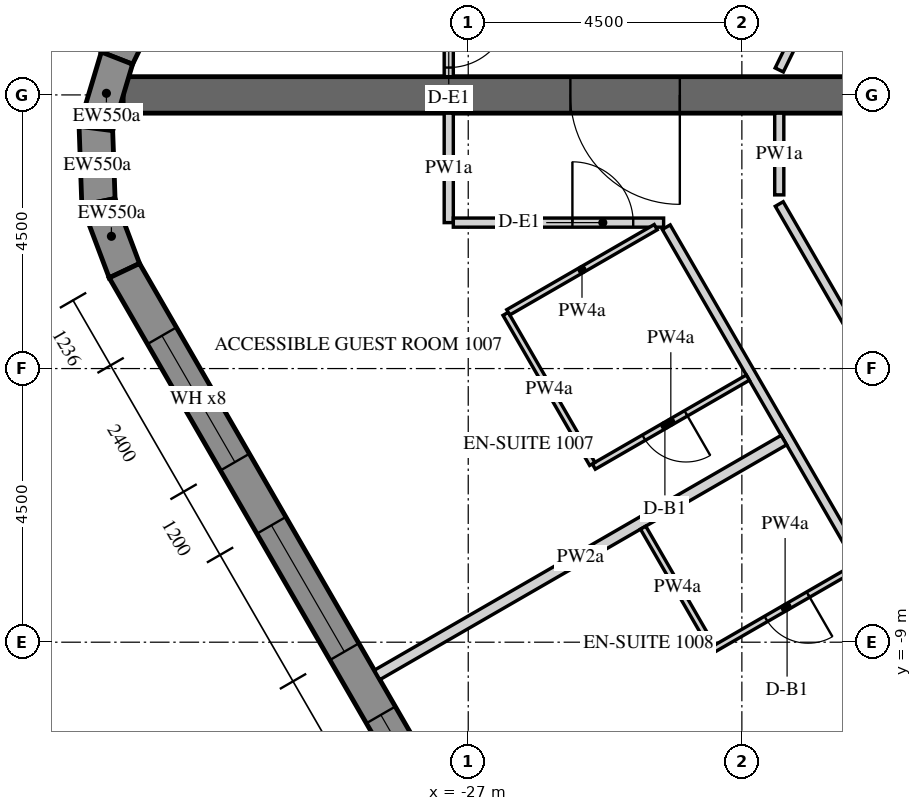
"""IFC4 building model, lengths in metres.
Left out: names, types, materials, properties, quantities, classifications, styles, units other than length and angle.
Written with IfcOpenShell. Run it as: python <this file> out.ifc"""

import sys

from ifc_helpers import new_model, si_unit, direction, frame, frame_2d, origin, place, context, subcontext, project, spatial, polyline, rectangle, outline, extrude, element, fill, save


model = new_model("IFC4")
c1 = context("Model", 3, precision=1e-05, world=origin(), true_north=direction((0.0, 1.0)))
c2 = subcontext(c1, "Body", "Model", "MODEL_VIEW")
j1 = project(units=[si_unit("LENGTHUNIT", "METRE"), si_unit("PLANEANGLEUNIT", "RADIAN")], contexts=[c1])
p1 = place(None, origin())
s1 = spatial("IfcSite", under=j1, at=p1, CompositionType="ELEMENT")
p2 = place(p1, origin())
s2 = spatial("IfcBuilding", under=s1, at=p2, CompositionType="ELEMENT")
p3 = place(p2, frame((0.0, 0.0, 142.8)))
s3 = spatial("IfcBuildingStorey", under=s2, at=p3, CompositionType="ELEMENT", Elevation=142.8)
p4 = place(p3, frame((-19.595, 27.633, -0.15), z_axis=(0.0, 0.0, 1.0), x_axis=(-0.438368285794, -0.898795441694, 0.0)))
e1 = element("IfcWall", 1, at=p4, inside=s3, PredefinedType="SOLIDWALL", context=c2, shape_type="SweptSolid", body=[
    extrude(outline(polyline([(-0.026, -0.275), (30.093, -0.275), (30.048, 0.275), (0.026, 0.275), (-0.026, -0.275)])), origin(), (0.0, 0.0, 1.0), 3.75),
])
p5 = place(p4, frame((1.236, 0.0, 1.05)))
e2 = element("IfcOpeningElement", 2, at=p5, cuts=e1, PredefinedType="OPENING", context=c2, shape_type="SweptSolid", body=[
    extrude(rectangle(XDim=2.4, YDim=2.4, at=frame_2d((1.2, 1.2))), frame((0.0, 0.285, 0.0), z_axis=(0.0, -1.0, 0.0), x_axis=(1.0, 0.0, 0.0)), (0.0, 0.0, 1.0), 0.57),
])
p6 = place(p4, frame((4.835, 0.0, 1.05)))
e3 = element("IfcOpeningElement", 3, at=p6, cuts=e1, PredefinedType="OPENING", context=c2, shape_type="SweptSolid", body=[
    extrude(rectangle(XDim=2.4, YDim=2.4, at=frame_2d((1.2, 1.2))), frame((0.0, 0.285, 0.0), z_axis=(0.0, -1.0, 0.0), x_axis=(1.0, 0.0, 0.0)), (0.0, 0.0, 1.0), 0.57),
])
p7 = place(p4, frame((8.436, 0.0, 1.05)))
e4 = element("IfcOpeningElement", 4, at=p7, cuts=e1, PredefinedType="OPENING", context=c2, shape_type="SweptSolid", body=[
    extrude(rectangle(XDim=2.4, YDim=2.4, at=frame_2d((1.2, 1.2))), frame((0.0, 0.285, 0.0), z_axis=(0.0, -1.0, 0.0), x_axis=(1.0, 0.0, 0.0)), (0.0, 0.0, 1.0), 0.57),
])
p8 = place(p4, frame((12.035, 0.0, 1.05)))
e5 = element("IfcOpeningElement", 5, at=p8, cuts=e1, PredefinedType="OPENING", context=c2, shape_type="SweptSolid", body=[
    extrude(rectangle(XDim=2.4, YDim=2.4, at=frame_2d((1.2, 1.2))), frame((0.0, 0.285, 0.0), z_axis=(0.0, -1.0, 0.0), x_axis=(1.0, 0.0, 0.0)), (0.0, 0.0, 1.0), 0.57),
])
p9 = place(p4, frame((15.635, 0.0, 1.05)))
e6 = element("IfcOpeningElement", 6, at=p9, cuts=e1, PredefinedType="OPENING", context=c2, shape_type="SweptSolid", body=[
    extrude(rectangle(XDim=2.4, YDim=2.4, at=frame_2d((1.2, 1.2))), frame((0.0, 0.285, 0.0), z_axis=(0.0, -1.0, 0.0), x_axis=(1.0, 0.0, 0.0)), (0.0, 0.0, 1.0), 0.57),
])
p10 = place(p4, frame((19.236, 0.0, 1.05)))
e7 = element("IfcOpeningElement", 7, at=p10, cuts=e1, PredefinedType="OPENING", context=c2, shape_type="SweptSolid", body=[
    extrude(rectangle(XDim=2.4, YDim=2.4, at=frame_2d((1.2, 1.2))), frame((0.0, 0.285, 0.0), z_axis=(0.0, -1.0, 0.0), x_axis=(1.0, 0.0, 0.0)), (0.0, 0.0, 1.0), 0.57),
])
p11 = place(p4, frame((22.835, 0.0, 1.05)))
e8 = element("IfcOpeningElement", 8, at=p11, cuts=e1, PredefinedType="OPENING", context=c2, shape_type="SweptSolid", body=[
    extrude(rectangle(XDim=2.4, YDim=2.4, at=frame_2d((1.2, 1.2))), frame((0.0, 0.285, 0.0), z_axis=(0.0, -1.0, 0.0), x_axis=(1.0, 0.0, 0.0)), (0.0, 0.0, 1.0), 0.57),
])
p12 = place(p4, frame((26.436, 0.0, 1.05)))
e9 = element("IfcOpeningElement", 9, at=p12, cuts=e1, PredefinedType="OPENING", context=c2, shape_type="SweptSolid", body=[
    extrude(rectangle(XDim=2.4, YDim=2.4, at=frame_2d((1.2, 1.2))), frame((0.0, 0.285, 0.0), z_axis=(0.0, -1.0, 0.0), x_axis=(1.0, 0.0, 0.0)), (0.0, 0.0, 1.0), 0.57),
])
p13 = place(p3, frame((-32.777, 0.605, -0.15), z_axis=(0.0, 0.0, 1.0), x_axis=(-0.286921497463, -0.957954098219, 0.0)))
e10 = element("IfcWall", 10, at=p13, inside=s3, PredefinedType="SOLIDWALL", context=c2, shape_type="SweptSolid", body=[
    extrude(outline(polyline([(-0.022, -0.275), (1.253, -0.275), (1.163, 0.275), (0.022, 0.275), (-0.022, -0.275)])), origin(), (0.0, 0.0, 1.0), 3.75),
])
p14 = place(p3, frame((-33.124, -0.552, -0.15), z_axis=(0.0, 0.0, 1.0), x_axis=(0.03495638276, -0.999388838893, 0.0)))
e11 = element("IfcWall", 11, at=p14, inside=s3, PredefinedType="SOLIDWALL", context=c2, shape_type="SweptSolid", body=[
    extrude(outline(polyline([(-0.045, -0.275), (1.253, -0.275), (1.163, 0.275), (0.045, 0.275), (-0.045, -0.275)])), origin(), (0.0, 0.0, 1.0), 3.75),
])
p15 = place(p3, frame((-33.081, -1.76, -0.15), z_axis=(0.0, 0.0, 1.0), x_axis=(0.353027214741, -0.935613053378, 0.0)))
e12 = element("IfcWall", 12, at=p15, inside=s3, PredefinedType="SOLIDWALL", context=c2, shape_type="SweptSolid", body=[
    extrude(outline(polyline([(-0.045, -0.275), (1.231, -0.275), (1.186, 0.275), (0.045, 0.275), (-0.045, -0.275)])), origin(), (0.0, 0.0, 1.0), 3.75),
])
p16 = place(p3, frame((-32.655, -2.89, -0.15), z_axis=(0.0, 0.0, 1.0), x_axis=(0.499997711317, -0.866026725152, 0.0)))
e13 = element("IfcWall", 13, at=p16, inside=s3, PredefinedType="SOLIDWALL", context=c2, shape_type="SweptSolid", body=[
    extrude(outline(polyline([(-0.022, -0.275), (30.097, -0.275), (30.045, 0.275), (0.022, 0.275), (-0.022, -0.275)])), origin(), (0.0, 0.0, 1.0), 3.75),
])
p17 = place(p16, frame((1.236, 0.0, 1.05)))
e14 = element("IfcOpeningElement", 14, at=p17, cuts=e13, PredefinedType="OPENING", context=c2, shape_type="SweptSolid", body=[
    extrude(rectangle(XDim=2.4, YDim=2.4, at=frame_2d((1.2, 1.2))), frame((0.0, 0.285, 0.0), z_axis=(0.0, -1.0, 0.0), x_axis=(1.0, 0.0, 0.0)), (0.0, 0.0, 1.0), 0.57),
])
p18 = place(p16, frame((4.835, 0.0, 1.05)))
e15 = element("IfcOpeningElement", 15, at=p18, cuts=e13, PredefinedType="OPENING", context=c2, shape_type="SweptSolid", body=[
    extrude(rectangle(XDim=2.4, YDim=2.4, at=frame_2d((1.2, 1.2))), frame((0.0, 0.285, 0.0), z_axis=(0.0, -1.0, 0.0), x_axis=(1.0, 0.0, 0.0)), (0.0, 0.0, 1.0), 0.57),
])
p19 = place(p16, frame((8.436, 0.0, 1.05)))
e16 = element("IfcOpeningElement", 16, at=p19, cuts=e13, PredefinedType="OPENING", context=c2, shape_type="SweptSolid", body=[
    extrude(rectangle(XDim=2.4, YDim=2.4, at=frame_2d((1.2, 1.2))), frame((0.0, 0.285, 0.0), z_axis=(0.0, -1.0, 0.0), x_axis=(1.0, 0.0, 0.0)), (0.0, 0.0, 1.0), 0.57),
])
p20 = place(p16, frame((12.035, 0.0, 1.05)))
e17 = element("IfcOpeningElement", 17, at=p20, cuts=e13, PredefinedType="OPENING", context=c2, shape_type="SweptSolid", body=[
    extrude(rectangle(XDim=2.4, YDim=2.4, at=frame_2d((1.2, 1.2))), frame((0.0, 0.285, 0.0), z_axis=(0.0, -1.0, 0.0), x_axis=(1.0, 0.0, 0.0)), (0.0, 0.0, 1.0), 0.57),
])
p21 = place(p16, frame((15.635, 0.0, 1.05)))
e18 = element("IfcOpeningElement", 18, at=p21, cuts=e13, PredefinedType="OPENING", context=c2, shape_type="SweptSolid", body=[
    extrude(rectangle(XDim=2.4, YDim=2.4, at=frame_2d((1.2, 1.2))), frame((0.0, 0.285, 0.0), z_axis=(0.0, -1.0, 0.0), x_axis=(1.0, 0.0, 0.0)), (0.0, 0.0, 1.0), 0.57),
])
p22 = place(p16, frame((19.236, 0.0, 1.05)))
e19 = element("IfcOpeningElement", 19, at=p22, cuts=e13, PredefinedType="OPENING", context=c2, shape_type="SweptSolid", body=[
    extrude(rectangle(XDim=2.4, YDim=2.4, at=frame_2d((1.2, 1.2))), frame((0.0, 0.285, 0.0), z_axis=(0.0, -1.0, 0.0), x_axis=(1.0, 0.0, 0.0)), (0.0, 0.0, 1.0), 0.57),
])
p23 = place(p16, frame((22.835, 0.0, 1.05)))
e20 = element("IfcOpeningElement", 20, at=p23, cuts=e13, PredefinedType="OPENING", context=c2, shape_type="SweptSolid", body=[
    extrude(rectangle(XDim=2.4, YDim=2.4, at=frame_2d((1.2, 1.2))), frame((0.0, 0.285, 0.0), z_axis=(0.0, -1.0, 0.0), x_axis=(1.0, 0.0, 0.0)), (0.0, 0.0, 1.0), 0.57),
])
p24 = place(p16, frame((26.436, 0.0, 1.05)))
e21 = element("IfcOpeningElement", 21, at=p24, cuts=e13, PredefinedType="OPENING", context=c2, shape_type="SweptSolid", body=[
    extrude(rectangle(XDim=2.4, YDim=2.4, at=frame_2d((1.2, 1.2))), frame((0.0, 0.285, 0.0), z_axis=(0.0, -1.0, 0.0), x_axis=(1.0, 0.0, 0.0)), (0.0, 0.0, 1.0), 0.57),
])
p25 = place(p3, frame((-16.166, 0.0, -0.15), z_axis=(0.0, 0.0, 1.0), x_axis=(-1.0, 0.0, 0.0)))
e22 = element("IfcWall", 22, at=p25, inside=s3, PredefinedType="SHEAR", context=c2, shape_type="SweptSolid", body=[
    extrude(rectangle(XDim=16.509, YDim=0.6, at=frame_2d((8.254, 0.0))), origin(), (0.0, 0.0, 1.0), 3.75),
])
p26 = place(p25, frame((7.354, 0.0, 0.15)))
e23 = element("IfcOpeningElement", 23, at=p26, cuts=e22, PredefinedType="OPENING", context=c2, shape_type="SweptSolid", body=[
    extrude(rectangle(XDim=1.8, YDim=2.4, at=frame_2d((0.9, 1.2))), frame((0.0, 0.31, 0.0), z_axis=(0.0, -1.0, 0.0), x_axis=(1.0, 0.0, 0.0)), (0.0, 0.0, 1.0), 0.62),
])
p27 = place(p3, frame((-27.32, 2.025, 0.0), z_axis=(0.0, 0.0, 1.0), x_axis=(0.0, -1.0, 0.0)))
e24 = element("IfcWall", 24, at=p27, inside=s3, PredefinedType="PARTITIONING", context=c2, shape_type="SweptSolid", body=[
    extrude(rectangle(XDim=1.725, YDim=0.15, at=frame_2d((0.862, 0.0))), origin(), (0.0, 0.0, 1.0), 2.838),
])
p28 = place(p27, frame((0.575, 0.0, 0.0)))
e25 = element("IfcOpeningElement", 25, at=p28, cuts=e24, PredefinedType="OPENING", context=c2, shape_type="SweptSolid", body=[
    extrude(rectangle(XDim=1.0, YDim=2.1, at=frame_2d((0.5, 1.05))), frame((0.0, 0.085, 0.0), z_axis=(0.0, -1.0, 0.0), x_axis=(1.0, 0.0, 0.0)), (0.0, 0.0, 1.0), 0.17),
])
p29 = place(p3, frame((-21.885, 0.41, 0.0), z_axis=(0.0, 0.0, 1.0), x_axis=(0.43837064471, 0.898794291179, 0.0)))
e26 = element("IfcWall", 26, at=p29, inside=s3, PredefinedType="PARTITIONING", context=c2, shape_type="SweptSolid", body=[
    extrude(rectangle(XDim=9.532, YDim=0.15, at=frame_2d((4.766, 0.0))), origin(), (0.0, 0.0, 1.0), 2.838),
])
p30 = place(p29, frame((4.316, 0.0, 0.0)))
e27 = element("IfcOpeningElement", 27, at=p30, cuts=e26, PredefinedType="OPENING", context=c2, shape_type="SweptSolid", body=[
    extrude(rectangle(XDim=0.9, YDim=2.1, at=frame_2d((0.45, 1.05))), frame((0.0, 0.085, 0.0), z_axis=(0.0, -1.0, 0.0), x_axis=(1.0, 0.0, 0.0)), (0.0, 0.0, 1.0), 0.17),
])
p31 = place(p3, frame((-27.32, -0.3, 0.0), z_axis=(0.0, 0.0, 1.0), x_axis=(0.0, -1.0, 0.0)))
e28 = element("IfcWall", 28, at=p31, inside=s3, PredefinedType="PARTITIONING", context=c2, shape_type="SweptSolid", body=[
    extrude(rectangle(XDim=1.8, YDim=0.15, at=frame_2d((0.9, 0.0))), origin(), (0.0, 0.0, 1.0), 2.838),
])
p32 = place(p3, frame((-27.245, -2.1, 0.0), z_axis=(0.0, 0.0, 1.0), x_axis=(1.0, 0.0, 0.0)))
e29 = element("IfcWall", 29, at=p32, inside=s3, PredefinedType="PARTITIONING", context=c2, shape_type="SweptSolid", body=[
    extrude(rectangle(XDim=3.458, YDim=0.15, at=frame_2d((1.729, 0.0))), origin(), (0.0, 0.0, 1.0), 2.838),
])
p33 = place(p32, frame((1.958, 0.0, 0.0)))
e30 = element("IfcOpeningElement", 30, at=p33, cuts=e29, PredefinedType="OPENING", context=c2, shape_type="SweptSolid", body=[
    extrude(rectangle(XDim=1.0, YDim=2.1, at=frame_2d((0.5, 1.05))), frame((0.0, 0.085, 0.0), z_axis=(0.0, -1.0, 0.0), x_axis=(1.0, 0.0, 0.0)), (0.0, 0.0, 1.0), 0.17),
])
p34 = place(p3, frame((-23.743, -2.175, 0.0), z_axis=(0.0, 0.0, 1.0), x_axis=(0.499992353047, -0.86602981871, 0.0)))
e31 = element("IfcWall", 31, at=p34, inside=s3, PredefinedType="PARTITIONING", context=c2, shape_type="SweptSolid", body=[
    extrude(rectangle(XDim=23.516, YDim=0.15, at=frame_2d((11.758, 0.0))), origin(), (0.0, 0.0, 1.0), 2.838),
])
p35 = place(p34, frame((10.099, 0.0, 0.0)))
e32 = element("IfcOpeningElement", 32, at=p35, cuts=e31, PredefinedType="OPENING", context=c2, shape_type="SweptSolid", body=[
    extrude(rectangle(XDim=1.0, YDim=2.1, at=frame_2d((0.5, 1.05))), frame((0.0, 0.085, 0.0), z_axis=(0.0, -1.0, 0.0), x_axis=(1.0, 0.0, 0.0)), (0.0, 0.0, 1.0), 0.17),
])
p36 = place(p34, frame((17.358, 0.0, 0.0)))
e33 = element("IfcOpeningElement", 33, at=p36, cuts=e31, PredefinedType="OPENING", context=c2, shape_type="SweptSolid", body=[
    extrude(rectangle(XDim=1.0, YDim=2.1, at=frame_2d((0.5, 1.05))), frame((0.0, 0.085, 0.0), z_axis=(0.0, -1.0, 0.0), x_axis=(1.0, 0.0, 0.0)), (0.0, 0.0, 1.0), 0.17),
])
p37 = place(p3, frame((-17.768, -8.926, 0.0), z_axis=(0.0, 0.0, 1.0), x_axis=(-0.499997033681, 0.866027116383, 0.0)))
e34 = element("IfcWall", 34, at=p37, inside=s3, PredefinedType="PARTITIONING", context=c2, shape_type="SweptSolid", body=[
    extrude(rectangle(XDim=8.235, YDim=0.15, at=frame_2d((4.118, 0.0))), origin(), (0.0, 0.0, 1.0), 2.838),
])
p38 = place(p37, frame((3.668, 0.0, 0.0)))
e35 = element("IfcOpeningElement", 35, at=p38, cuts=e34, PredefinedType="OPENING", context=c2, shape_type="SweptSolid", body=[
    extrude(rectangle(XDim=0.9, YDim=2.1, at=frame_2d((0.45, 1.05))), frame((0.0, 0.085, 0.0), z_axis=(0.0, -1.0, 0.0), x_axis=(1.0, 0.0, 0.0)), (0.0, 0.0, 1.0), 0.17),
])
p39 = place(p3, frame((-21.885, -1.644, 0.0), z_axis=(0.0, 0.0, 1.0), x_axis=(0.0, 1.0, 0.0)))
e36 = element("IfcWall", 36, at=p39, inside=s3, PredefinedType="PARTITIONING", context=c2, shape_type="SweptSolid", body=[
    extrude(rectangle(XDim=1.344, YDim=0.15, at=frame_2d((0.672, 0.0))), origin(), (0.0, 0.0, 1.0), 2.838),
])
p40 = place(p3, frame((-22.402, -4.649, 0.0), z_axis=(0.0, 0.0, 1.0), x_axis=(-0.865989585315, -0.500062034277, 0.0)))
e37 = element("IfcWall", 37, at=p40, inside=s3, PredefinedType="PARTITIONING", context=c2, shape_type="SweptSolid", body=[
    extrude(rectangle(XDim=2.925, YDim=0.1, at=frame_2d((1.462, 0.0))), origin(), (0.0, 0.0, 1.0), 2.838),
])
p41 = place(p40, frame((1.175, 0.0, 0.0)))
e38 = element("IfcOpeningElement", 38, at=p41, cuts=e37, PredefinedType="OPENING", context=c2, shape_type="SweptSolid", body=[
    extrude(rectangle(XDim=0.8, YDim=2.1, at=frame_2d((0.4, 1.05))), frame((0.0, 0.06, 0.0), z_axis=(0.0, -1.0, 0.0), x_axis=(1.0, 0.0, 0.0)), (0.0, 0.0, 1.0), 0.12),
])
p42 = place(p3, frame((-24.96, -6.068, 0.0), z_axis=(0.0, 0.0, 1.0), x_axis=(-0.500036373335, 0.866004402611, 0.0)))
e39 = element("IfcWall", 39, at=p42, inside=s3, PredefinedType="PARTITIONING", context=c2, shape_type="SweptSolid", body=[
    extrude(rectangle(XDim=2.85, YDim=0.1, at=frame_2d((1.425, 0.0))), origin(), (0.0, 0.0, 1.0), 2.838),
])
p43 = place(p3, frame((-26.342, -3.575, 0.0), z_axis=(0.0, 0.0, 1.0), x_axis=(0.866034573852, 0.49998411664, 0.0)))
e40 = element("IfcWall", 40, at=p43, inside=s3, PredefinedType="PARTITIONING", context=c2, shape_type="SweptSolid", body=[
    extrude(rectangle(XDim=2.8, YDim=0.1, at=frame_2d((1.4, 0.0))), origin(), (0.0, 0.0, 1.0), 2.838),
])
p44 = place(p3, frame((-28.499, -9.538, 0.0), z_axis=(0.0, 0.0, 1.0), x_axis=(0.866040859435, 0.499973229072, 0.0)))
e41 = element("IfcWall", 41, at=p44, inside=s3, PredefinedType="PARTITIONING", context=c2, shape_type="SweptSolid", body=[
    extrude(rectangle(XDim=7.725, YDim=0.18, at=frame_2d((3.863, 0.0))), origin(), (0.0, 0.0, 1.0), 2.838),
])
p45 = place(p3, frame((-20.609, -7.754, 0.0), z_axis=(0.0, 0.0, 1.0), x_axis=(-0.866012511928, -0.500022328685, 0.0)))
e42 = element("IfcWall", 42, at=p45, inside=s3, PredefinedType="PARTITIONING", context=c2, shape_type="SweptSolid", body=[
    extrude(rectangle(XDim=2.725, YDim=0.1, at=frame_2d((1.363, 0.0))), origin(), (0.0, 0.0, 1.0), 2.838),
])
p46 = place(p45, frame((0.925, 0.0, 0.0)))
e43 = element("IfcOpeningElement", 43, at=p46, cuts=e42, PredefinedType="OPENING", context=c2, shape_type="SweptSolid", body=[
    extrude(rectangle(XDim=0.8, YDim=2.1, at=frame_2d((0.4, 1.05))), frame((0.0, 0.06, 0.0), z_axis=(0.0, -1.0, 0.0), x_axis=(1.0, 0.0, 0.0)), (0.0, 0.0, 1.0), 0.12),
])
p47 = place(p3, frame((-22.994, -9.073, 0.0), z_axis=(0.0, 0.0, 1.0), x_axis=(-0.4999967785, 0.866027263711, 0.0)))
e44 = element("IfcWall", 44, at=p47, inside=s3, PredefinedType="PARTITIONING", context=c2, shape_type="SweptSolid", body=[
    extrude(rectangle(XDim=2.26, YDim=0.1, at=frame_2d((1.13, 0.0))), origin(), (0.0, 0.0, 1.0), 2.838),
])
p48 = place(p17, frame((0.0, 0.205, 0.0)))
e45 = element("IfcWindow", 45, at=p48, inside=s3, PartitioningType="DOUBLE_PANEL_VERTICAL", PredefinedType="WINDOW", context=c2, shape_type="SweptSolid", body=[
    extrude(rectangle(XDim=2.4, YDim=2.4, at=frame_2d((1.2, 1.2))), frame((0.0, 0.03, 0.0), z_axis=(0.0, -1.0, 0.0), x_axis=(1.0, 0.0, 0.0)), (0.0, 0.0, 1.0), 0.06),
])
fill(e14, e45)
p49 = place(p18, frame((0.0, 0.205, 0.0)))
e46 = element("IfcWindow", 46, at=p49, inside=s3, PartitioningType="DOUBLE_PANEL_VERTICAL", PredefinedType="WINDOW", context=c2, shape_type="SweptSolid", body=[
    extrude(rectangle(XDim=2.4, YDim=2.4, at=frame_2d((1.2, 1.2))), frame((0.0, 0.03, 0.0), z_axis=(0.0, -1.0, 0.0), x_axis=(1.0, 0.0, 0.0)), (0.0, 0.0, 1.0), 0.06),
])
fill(e15, e46)
p50 = place(p19, frame((0.0, 0.205, 0.0)))
e47 = element("IfcWindow", 47, at=p50, inside=s3, PartitioningType="DOUBLE_PANEL_VERTICAL", PredefinedType="WINDOW", context=c2, shape_type="SweptSolid", body=[
    extrude(rectangle(XDim=2.4, YDim=2.4, at=frame_2d((1.2, 1.2))), frame((0.0, 0.03, 0.0), z_axis=(0.0, -1.0, 0.0), x_axis=(1.0, 0.0, 0.0)), (0.0, 0.0, 1.0), 0.06),
])
fill(e16, e47)
p51 = place(p26, origin())
e48 = element("IfcDoor", 48, at=p51, inside=s3, OperationType="DOUBLE_DOOR_SINGLE_SWING", PredefinedType="DOOR", context=c2, shape_type="SweptSolid", body=[
    extrude(rectangle(XDim=1.8, YDim=2.4, at=frame_2d((0.9, 1.2))), frame((0.0, 0.025, 0.0), z_axis=(0.0, -1.0, 0.0), x_axis=(1.0, 0.0, 0.0)), (0.0, 0.0, 1.0), 0.05),
])
fill(e23, e48)
p52 = place(p28, origin())
e49 = element("IfcDoor", 49, at=p52, inside=s3, OperationType="SINGLE_SWING_LEFT", PredefinedType="DOOR", context=c2, shape_type="SweptSolid", body=[
    extrude(rectangle(XDim=1.0, YDim=2.1, at=frame_2d((0.5, 1.05))), frame((0.0, 0.025, 0.0), z_axis=(0.0, -1.0, 0.0), x_axis=(1.0, 0.0, 0.0)), (0.0, 0.0, 1.0), 0.05),
])
fill(e25, e49)
p53 = place(p33, origin())
e50 = element("IfcDoor", 50, at=p53, inside=s3, OperationType="SINGLE_SWING_LEFT", PredefinedType="DOOR", context=c2, shape_type="SweptSolid", body=[
    extrude(rectangle(XDim=1.0, YDim=2.1, at=frame_2d((0.5, 1.05))), frame((0.0, 0.025, 0.0), z_axis=(0.0, -1.0, 0.0), x_axis=(1.0, 0.0, 0.0)), (0.0, 0.0, 1.0), 0.05),
])
fill(e30, e50)
p54 = place(p41, origin())
e51 = element("IfcDoor", 51, at=p54, inside=s3, OperationType="SINGLE_SWING_LEFT", PredefinedType="DOOR", context=c2, shape_type="SweptSolid", body=[
    extrude(rectangle(XDim=0.8, YDim=2.1, at=frame_2d((0.4, 1.05))), frame((0.0, 0.025, 0.0), z_axis=(0.0, -1.0, 0.0), x_axis=(1.0, 0.0, 0.0)), (0.0, 0.0, 1.0), 0.05),
])
fill(e38, e51)
p55 = place(p46, origin())
e52 = element("IfcDoor", 52, at=p55, inside=s3, OperationType="SINGLE_SWING_RIGHT", PredefinedType="DOOR", context=c2, shape_type="SweptSolid", body=[
    extrude(rectangle(XDim=0.8, YDim=2.1, at=frame_2d((0.4, 1.05))), frame((0.0, 0.025, 0.0), z_axis=(0.0, -1.0, 0.0), x_axis=(1.0, 0.0, 0.0)), (0.0, 0.0, 1.0), 0.05),
])
fill(e43, e52)
save(model, sys.argv[1])
